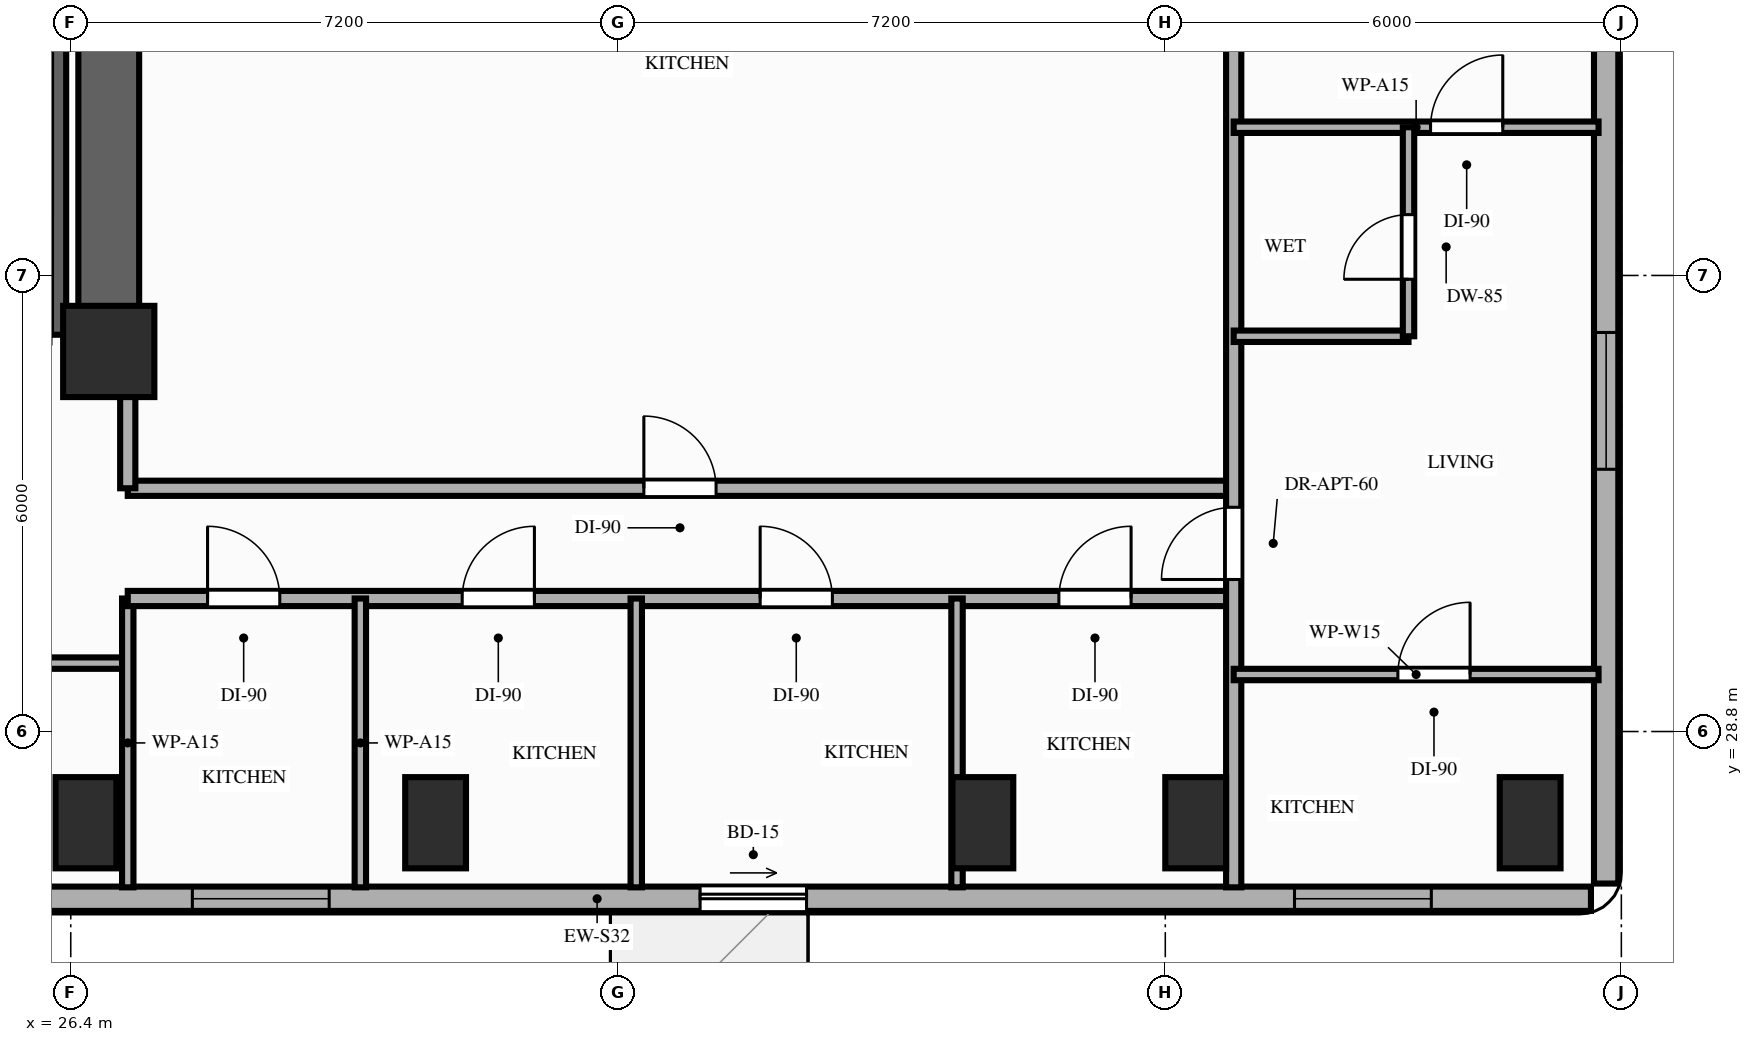
"""IFC4 building model, lengths in metres.
Left out: names, types, materials, properties, quantities, classifications, styles, units other than length and angle.
Written with IfcOpenShell. Run it as: python <this file> out.ifc"""

import sys

from ifc_helpers import new_model, si_unit, direction, frame, frame_2d, origin, origin_2d, place, context, subcontext, project, spatial, rectangle, extrude, element, fill, save


model = new_model("IFC4")
c1 = context("Model", 3, precision=1e-05, world=origin(), true_north=direction((0.0, 1.0)))
c2 = subcontext(c1, "Body", "Model", "MODEL_VIEW")
j1 = project(units=[si_unit("LENGTHUNIT", "METRE"), si_unit("PLANEANGLEUNIT", "RADIAN")], contexts=[c1])
p1 = place(None, origin())
s1 = spatial("IfcSite", under=j1, at=p1, CompositionType="ELEMENT")
p2 = place(p1, origin())
s2 = spatial("IfcBuilding", under=s1, at=p2, CompositionType="ELEMENT")
p3 = place(p2, frame((0.0, 0.0, 99.4)))
s3 = spatial("IfcBuildingStorey", under=s2, at=p3, CompositionType="ELEMENT", Elevation=99.4)
p4 = place(p3, frame((26.9, 33.8, 0.0), z_axis=(0.0, 0.0, 1.0), x_axis=(1.0, 0.0, 0.0)))
e1 = element("IfcColumn", 1, at=p4, inside=s3, PredefinedType="COLUMN", context=c2, shape_type="SweptSolid", body=[
    extrude(rectangle(XDim=1.2, YDim=1.2, at=origin_2d()), origin(), (0.0, 0.0, 1.0), 3.2),
])
for number, where, z_axis, x_axis in (
    (2, (26.6, 27.6, 0.0), (0.0, 0.0, 1.0), (1.0, 0.0, 0.0)),
    (3, (31.2, 27.6, 0.0), (0.0, 0.0, 1.0), (1.0, 0.0, 0.0)),
    (4, (38.4, 27.6, 0.0), (0.0, 0.0, 1.0), (1.0, 0.0, 0.0)),
    (5, (41.2, 27.6, 0.0), (0.0, 0.0, 1.0), (1.0, 0.0, 0.0)),
    (6, (45.6, 27.6, 0.0), (0.0, 0.0, 1.0), (1.0, 0.0, 0.0)),
):
    element("IfcColumn", number, at=place(p3, frame(where, z_axis=z_axis, x_axis=x_axis)), inside=s3, PredefinedType="COLUMN", context=c2, shape_type="SweptSolid", body=[
        extrude(rectangle(XDim=0.8, YDim=1.2, at=origin_2d()), origin(), (0.0, 0.0, 1.0), 3.2),
    ])
p5 = place(p3, frame((20.25, 26.6, 0.0), z_axis=(0.0, 0.0, 1.0), x_axis=(1.0, 0.0, 0.0)))
e7 = element("IfcWall", 7, at=p5, inside=s3, PredefinedType="STANDARD", context=c2, shape_type="SweptSolid", body=[
    extrude(rectangle(XDim=26.15, YDim=0.32, at=frame_2d((13.075, 0.0))), origin(), (0.0, 0.0, 1.0), 2.96),
])
p6 = place(p5, frame((14.43, 0.0, 0.0)))
e8 = element("IfcOpeningElement", 8, at=p6, cuts=e7, PredefinedType="OPENING", context=c2, shape_type="SweptSolid", body=[
    extrude(rectangle(XDim=1.4, YDim=2.1, at=frame_2d((0.7, 1.05))), frame((0.0, 0.17, 0.0), z_axis=(0.0, -1.0, 0.0), x_axis=(1.0, 0.0, 0.0)), (0.0, 0.0, 1.0), 0.34),
])
p7 = place(p5, frame((2.25, 0.0, 0.85)))
e9 = element("IfcOpeningElement", 9, at=p7, cuts=e7, PredefinedType="OPENING", context=c2, shape_type="SweptSolid", body=[
    extrude(rectangle(XDim=1.8, YDim=1.75, at=frame_2d((0.9, 0.875))), frame((0.0, 0.17, 0.0), z_axis=(0.0, -1.0, 0.0), x_axis=(1.0, 0.0, 0.0)), (0.0, 0.0, 1.0), 0.34),
])
p8 = place(p5, frame((7.75, 0.0, 0.85)))
e10 = element("IfcOpeningElement", 10, at=p8, cuts=e7, PredefinedType="OPENING", context=c2, shape_type="SweptSolid", body=[
    extrude(rectangle(XDim=1.8, YDim=1.75, at=frame_2d((0.9, 0.875))), frame((0.0, 0.17, 0.0), z_axis=(0.0, -1.0, 0.0), x_axis=(1.0, 0.0, 0.0)), (0.0, 0.0, 1.0), 0.34),
])
p9 = place(p5, frame((22.25, 0.0, 0.85)))
e11 = element("IfcOpeningElement", 11, at=p9, cuts=e7, PredefinedType="OPENING", context=c2, shape_type="SweptSolid", body=[
    extrude(rectangle(XDim=1.8, YDim=1.75, at=frame_2d((0.9, 0.875))), frame((0.0, 0.17, 0.0), z_axis=(0.0, -1.0, 0.0), x_axis=(1.0, 0.0, 0.0)), (0.0, 0.0, 1.0), 0.34),
])
p10 = place(p3, frame((46.6, 26.8, 0.0), z_axis=(0.0, 0.0, 1.0), x_axis=(0.0, 1.0, 0.0)))
e12 = element("IfcWall", 12, at=p10, inside=s3, PredefinedType="STANDARD", context=c2, shape_type="SweptSolid", body=[
    extrude(rectangle(XDim=15.35, YDim=0.32, at=frame_2d((7.675, 0.0))), origin(), (0.0, 0.0, 1.0), 2.35),
])
p11 = place(p10, frame((5.45, 0.0, 0.85)))
e13 = element("IfcOpeningElement", 13, at=p11, cuts=e12, PredefinedType="OPENING", context=c2, shape_type="SweptSolid", body=[
    extrude(rectangle(XDim=1.8, YDim=1.25, at=frame_2d((0.9, 0.625))), frame((0.0, 0.17, 0.0), z_axis=(0.0, -1.0, 0.0), x_axis=(1.0, 0.0, 0.0)), (0.0, 0.0, 1.0), 0.34),
])
p12 = place(p10, frame((11.68, 0.0, 0.85)))
e14 = element("IfcOpeningElement", 14, at=p12, cuts=e12, PredefinedType="OPENING", context=c2, shape_type="SweptSolid", body=[
    extrude(rectangle(XDim=1.8, YDim=1.25, at=frame_2d((0.9, 0.625))), frame((0.0, 0.17, 0.0), z_axis=(0.0, -1.0, 0.0), x_axis=(1.0, 0.0, 0.0)), (0.0, 0.0, 1.0), 0.34),
])
p13 = place(p3, frame((26.9, 33.8, 0.0), z_axis=(0.0, 0.0, 1.0), x_axis=(0.0, 1.0, 0.0)))
e15 = element("IfcWall", 15, at=p13, inside=s3, PredefinedType="SHEAR", context=c2, shape_type="SweptSolid", body=[
    extrude(rectangle(XDim=7.95, YDim=0.8, at=frame_2d((3.975, 0.0))), origin(), (0.0, 0.0, 1.0), 2.96),
])
p14 = place(p3, frame((26.24, 34.02, 0.0), z_axis=(0.0, 0.0, 1.0), x_axis=(0.0, 1.0, 0.0)))
e16 = element("IfcWall", 16, at=p14, inside=s3, PredefinedType="SHEAR", context=c2, shape_type="SweptSolid", body=[
    extrude(rectangle(XDim=7.78, YDim=0.2, at=frame_2d((3.89, 0.0))), origin(), (0.0, 0.0, 1.0), 2.96),
])
p15 = place(p3, frame((20.45, 29.7, 0.0), z_axis=(0.0, 0.0, 1.0), x_axis=(1.0, 0.0, 0.0)))
e17 = element("IfcWall", 17, at=p15, inside=s3, PredefinedType="PARTITIONING", context=c2, shape_type="SweptSolid", body=[
    extrude(rectangle(XDim=6.7, YDim=0.15, at=frame_2d((3.35, 0.0))), origin(), (0.0, 0.0, 1.0), 2.96),
])
p16 = place(p15, frame((2.8, 0.0, 0.0)))
e18 = element("IfcOpeningElement", 18, at=p16, cuts=e17, PredefinedType="OPENING", context=c2, shape_type="SweptSolid", body=[
    extrude(rectangle(XDim=0.95, YDim=2.15, at=frame_2d((0.475, 1.075))), frame((0.0, 0.085, 0.0), z_axis=(0.0, -1.0, 0.0), x_axis=(1.0, 0.0, 0.0)), (0.0, 0.0, 1.0), 0.17),
])
p17 = place(p3, frame((27.15, 26.75, 0.0), z_axis=(0.0, 0.0, 1.0), x_axis=(0.0, 1.0, 0.0)))
e19 = element("IfcWall", 19, at=p17, inside=s3, PredefinedType="PARTITIONING", context=c2, shape_type="SweptSolid", body=[
    extrude(rectangle(XDim=3.8, YDim=0.15, at=frame_2d((1.9, 0.0))), origin(), (0.0, 0.0, 1.0), 2.35),
])
p18 = place(p3, frame((27.15, 30.55, 0.0), z_axis=(0.0, 0.0, 1.0), x_axis=(1.0, 0.0, 0.0)))
e20 = element("IfcWall", 20, at=p18, inside=s3, PredefinedType="PARTITIONING", context=c2, shape_type="SweptSolid", body=[
    extrude(rectangle(XDim=14.55, YDim=0.2, at=frame_2d((7.275, 0.0))), origin(), (0.0, 0.0, 1.0), 2.35),
])
p19 = place(p18, frame((1.05, 0.0, 0.0)))
e21 = element("IfcOpeningElement", 21, at=p19, cuts=e20, PredefinedType="OPENING", context=c2, shape_type="SweptSolid", body=[
    extrude(rectangle(XDim=0.95, YDim=2.15, at=frame_2d((0.475, 1.075))), frame((0.0, 0.11, 0.0), z_axis=(0.0, -1.0, 0.0), x_axis=(1.0, 0.0, 0.0)), (0.0, 0.0, 1.0), 0.22),
])
p20 = place(p18, frame((4.4, 0.0, 0.0)))
e22 = element("IfcOpeningElement", 22, at=p20, cuts=e20, PredefinedType="OPENING", context=c2, shape_type="SweptSolid", body=[
    extrude(rectangle(XDim=0.95, YDim=2.15, at=frame_2d((0.475, 1.075))), frame((0.0, 0.11, 0.0), z_axis=(0.0, -1.0, 0.0), x_axis=(1.0, 0.0, 0.0)), (0.0, 0.0, 1.0), 0.22),
])
p21 = place(p18, frame((8.32, 0.0, 0.0)))
e23 = element("IfcOpeningElement", 23, at=p21, cuts=e20, PredefinedType="OPENING", context=c2, shape_type="SweptSolid", body=[
    extrude(rectangle(XDim=0.95, YDim=2.15, at=frame_2d((0.475, 1.075))), frame((0.0, 0.11, 0.0), z_axis=(0.0, -1.0, 0.0), x_axis=(1.0, 0.0, 0.0)), (0.0, 0.0, 1.0), 0.22),
])
p22 = place(p18, frame((12.25, 0.0, 0.0)))
e24 = element("IfcOpeningElement", 24, at=p22, cuts=e20, PredefinedType="OPENING", context=c2, shape_type="SweptSolid", body=[
    extrude(rectangle(XDim=0.95, YDim=2.15, at=frame_2d((0.475, 1.075))), frame((0.0, 0.11, 0.0), z_axis=(0.0, -1.0, 0.0), x_axis=(1.0, 0.0, 0.0)), (0.0, 0.0, 1.0), 0.22),
])
p23 = place(p3, frame((27.15, 32.0, 0.0), z_axis=(0.0, 0.0, 1.0), x_axis=(1.0, 0.0, 0.0)))
e25 = element("IfcWall", 25, at=p23, inside=s3, PredefinedType="PARTITIONING", context=c2, shape_type="SweptSolid", body=[
    extrude(rectangle(XDim=14.55, YDim=0.2, at=frame_2d((7.275, 0.0))), origin(), (0.0, 0.0, 1.0), 2.35),
])
p24 = place(p23, frame((6.79, 0.0, 0.0)))
e26 = element("IfcOpeningElement", 26, at=p24, cuts=e25, PredefinedType="OPENING", context=c2, shape_type="SweptSolid", body=[
    extrude(rectangle(XDim=0.95, YDim=2.15, at=frame_2d((0.475, 1.075))), frame((0.0, 0.11, 0.0), z_axis=(0.0, -1.0, 0.0), x_axis=(1.0, 0.0, 0.0)), (0.0, 0.0, 1.0), 0.22),
])
p25 = place(p3, frame((27.15, 32.0, 0.0), z_axis=(0.0, 0.0, 1.0), x_axis=(0.0, 1.0, 0.0)))
e27 = element("IfcWall", 27, at=p25, inside=s3, PredefinedType="PARTITIONING", context=c2, shape_type="SweptSolid", body=[
    extrude(rectangle(XDim=1.68, YDim=0.2, at=frame_2d((0.84, 0.0))), origin(), (0.0, 0.0, 1.0), 2.35),
])
p26 = place(p3, frame((41.7, 26.75, 0.0), z_axis=(0.0, 0.0, 1.0), x_axis=(0.0, 1.0, 0.0)))
e28 = element("IfcWall", 28, at=p26, inside=s3, PredefinedType="PARTITIONING", context=c2, shape_type="SweptSolid", body=[
    extrude(rectangle(XDim=15.45, YDim=0.2, at=frame_2d((7.725, 0.0))), origin(), (0.0, 0.0, 1.0), 2.35),
])
p27 = place(p26, frame((4.05, 0.0, 0.0)))
e29 = element("IfcOpeningElement", 29, at=p27, cuts=e28, PredefinedType="OPENING", context=c2, shape_type="SweptSolid", body=[
    extrude(rectangle(XDim=0.95, YDim=2.15, at=frame_2d((0.475, 1.075))), frame((0.0, 0.11, 0.0), z_axis=(0.0, -1.0, 0.0), x_axis=(1.0, 0.0, 0.0)), (0.0, 0.0, 1.0), 0.22),
])
p28 = place(p3, frame((41.7, 29.55, 0.0), z_axis=(0.0, 0.0, 1.0), x_axis=(1.0, 0.0, 0.0)))
e30 = element("IfcWall", 30, at=p28, inside=s3, PredefinedType="PARTITIONING", context=c2, shape_type="SweptSolid", body=[
    extrude(rectangle(XDim=4.8, YDim=0.15, at=frame_2d((2.4, 0.0))), origin(), (0.0, 0.0, 1.0), 2.35),
])
p29 = place(p28, frame((2.16, 0.0, 0.0)))
e31 = element("IfcOpeningElement", 31, at=p29, cuts=e30, PredefinedType="OPENING", context=c2, shape_type="SweptSolid", body=[
    extrude(rectangle(XDim=0.95, YDim=2.15, at=frame_2d((0.475, 1.075))), frame((0.0, 0.085, 0.0), z_axis=(0.0, -1.0, 0.0), x_axis=(1.0, 0.0, 0.0)), (0.0, 0.0, 1.0), 0.17),
])
p30 = place(p3, frame((41.7, 36.75, 0.0), z_axis=(0.0, 0.0, 1.0), x_axis=(1.0, 0.0, 0.0)))
e32 = element("IfcWall", 32, at=p30, inside=s3, PredefinedType="PARTITIONING", context=c2, shape_type="SweptSolid", body=[
    extrude(rectangle(XDim=4.8, YDim=0.15, at=frame_2d((2.4, 0.0))), origin(), (0.0, 0.0, 1.0), 2.35),
])
p31 = place(p30, frame((2.59, 0.0, 0.0)))
e33 = element("IfcOpeningElement", 33, at=p31, cuts=e32, PredefinedType="OPENING", context=c2, shape_type="SweptSolid", body=[
    extrude(rectangle(XDim=0.95, YDim=2.15, at=frame_2d((0.475, 1.075))), frame((0.0, 0.085, 0.0), z_axis=(0.0, -1.0, 0.0), x_axis=(1.0, 0.0, 0.0)), (0.0, 0.0, 1.0), 0.17),
])
p32 = place(p3, frame((41.7, 34.0, 0.0), z_axis=(0.0, 0.0, 1.0), x_axis=(1.0, 0.0, 0.0)))
e34 = element("IfcWall", 34, at=p32, inside=s3, PredefinedType="PARTITIONING", context=c2, shape_type="SweptSolid", body=[
    extrude(rectangle(XDim=2.3, YDim=0.15, at=frame_2d((1.15, 0.0))), origin(), (0.0, 0.0, 1.0), 2.96),
])
p33 = place(p3, frame((44.0, 34.0, 0.0), z_axis=(0.0, 0.0, 1.0), x_axis=(0.0, 1.0, 0.0)))
e35 = element("IfcWall", 35, at=p33, inside=s3, PredefinedType="PARTITIONING", context=c2, shape_type="SweptSolid", body=[
    extrude(rectangle(XDim=2.75, YDim=0.15, at=frame_2d((1.375, 0.0))), origin(), (0.0, 0.0, 1.0), 2.54),
])
p34 = place(p33, frame((0.75, 0.0, 0.0)))
e36 = element("IfcOpeningElement", 36, at=p34, cuts=e35, PredefinedType="OPENING", context=c2, shape_type="SweptSolid", body=[
    extrude(rectangle(XDim=0.85, YDim=2.1, at=frame_2d((0.425, 1.05))), frame((0.0, 0.085, 0.0), z_axis=(0.0, -1.0, 0.0), x_axis=(1.0, 0.0, 0.0)), (0.0, 0.0, 1.0), 0.17),
])
for number, where, z_axis, x_axis in (
    (37, (30.21, 26.75, 0.0), (0.0, 0.0, 1.0), (0.0, 1.0, 0.0)),
    (38, (33.84, 26.75, 0.0), (0.0, 0.0, 1.0), (0.0, 1.0, 0.0)),
    (39, (38.06, 26.75, 0.0), (0.0, 0.0, 1.0), (0.0, 1.0, 0.0)),
):
    element("IfcWall", number, at=place(p3, frame(where, z_axis=z_axis, x_axis=x_axis)), inside=s3, PredefinedType="PARTITIONING", context=c2, shape_type="SweptSolid", body=[
        extrude(rectangle(XDim=3.8, YDim=0.15, at=frame_2d((1.9, 0.0))), origin(), (0.0, 0.0, 1.0), 2.35),
    ])
p35 = place(p6, origin())
e40 = element("IfcDoor", 40, at=p35, inside=s3, OperationType="SLIDING_TO_RIGHT", PredefinedType="DOOR", context=c2, shape_type="SweptSolid", body=[
    extrude(rectangle(XDim=1.4, YDim=2.1, at=frame_2d((0.7, 1.05))), frame((0.0, 0.025, 0.0), z_axis=(0.0, -1.0, 0.0), x_axis=(1.0, 0.0, 0.0)), (0.0, 0.0, 1.0), 0.05),
])
fill(e8, e40)
p36 = place(p11, origin())
e41 = element("IfcWindow", 41, at=p36, inside=s3, PartitioningType="SINGLE_PANEL", PredefinedType="WINDOW", context=c2, shape_type="SweptSolid", body=[
    extrude(rectangle(XDim=1.8, YDim=1.25, at=frame_2d((0.9, 0.625))), frame((0.0, 0.03, 0.0), z_axis=(0.0, -1.0, 0.0), x_axis=(1.0, 0.0, 0.0)), (0.0, 0.0, 1.0), 0.06),
])
fill(e13, e41)
p37 = place(p8, origin())
e42 = element("IfcWindow", 42, at=p37, inside=s3, PartitioningType="SINGLE_PANEL", PredefinedType="WINDOW", context=c2, shape_type="SweptSolid", body=[
    extrude(rectangle(XDim=1.8, YDim=1.75, at=frame_2d((0.9, 0.875))), frame((0.0, 0.03, 0.0), z_axis=(0.0, -1.0, 0.0), x_axis=(1.0, 0.0, 0.0)), (0.0, 0.0, 1.0), 0.06),
])
fill(e10, e42)
p38 = place(p9, origin())
e43 = element("IfcWindow", 43, at=p38, inside=s3, PartitioningType="SINGLE_PANEL", PredefinedType="WINDOW", context=c2, shape_type="SweptSolid", body=[
    extrude(rectangle(XDim=1.8, YDim=1.75, at=frame_2d((0.9, 0.875))), frame((0.0, 0.03, 0.0), z_axis=(0.0, -1.0, 0.0), x_axis=(1.0, 0.0, 0.0)), (0.0, 0.0, 1.0), 0.06),
])
fill(e11, e43)
p39 = place(p27, origin())
e44 = element("IfcDoor", 44, at=p39, inside=s3, OperationType="SINGLE_SWING_LEFT", PredefinedType="DOOR", context=c2, shape_type="SweptSolid", body=[
    extrude(rectangle(XDim=0.95, YDim=2.15, at=frame_2d((0.475, 1.075))), frame((0.0, 0.025, 0.0), z_axis=(0.0, -1.0, 0.0), x_axis=(1.0, 0.0, 0.0)), (0.0, 0.0, 1.0), 0.05),
])
fill(e29, e44)
p40 = place(p31, origin())
e45 = element("IfcDoor", 45, at=p40, inside=s3, OperationType="SINGLE_SWING_RIGHT", PredefinedType="DOOR", context=c2, shape_type="SweptSolid", body=[
    extrude(rectangle(XDim=0.95, YDim=2.15, at=frame_2d((0.475, 1.075))), frame((0.0, 0.025, 0.0), z_axis=(0.0, -1.0, 0.0), x_axis=(1.0, 0.0, 0.0)), (0.0, 0.0, 1.0), 0.05),
])
fill(e33, e45)
p41 = place(p34, origin())
e46 = element("IfcDoor", 46, at=p41, inside=s3, OperationType="SINGLE_SWING_LEFT", PredefinedType="DOOR", context=c2, shape_type="SweptSolid", body=[
    extrude(rectangle(XDim=0.85, YDim=2.1, at=frame_2d((0.425, 1.05))), frame((0.0, 0.025, 0.0), z_axis=(0.0, -1.0, 0.0), x_axis=(1.0, 0.0, 0.0)), (0.0, 0.0, 1.0), 0.05),
])
fill(e36, e46)
p42 = place(p29, origin())
e47 = element("IfcDoor", 47, at=p42, inside=s3, OperationType="SINGLE_SWING_RIGHT", PredefinedType="DOOR", context=c2, shape_type="SweptSolid", body=[
    extrude(rectangle(XDim=0.95, YDim=2.15, at=frame_2d((0.475, 1.075))), frame((0.0, 0.025, 0.0), z_axis=(0.0, -1.0, 0.0), x_axis=(1.0, 0.0, 0.0)), (0.0, 0.0, 1.0), 0.05),
])
fill(e31, e47)
p43 = place(p19, origin())
e48 = element("IfcDoor", 48, at=p43, inside=s3, OperationType="SINGLE_SWING_LEFT", PredefinedType="DOOR", context=c2, shape_type="SweptSolid", body=[
    extrude(rectangle(XDim=0.95, YDim=2.15, at=frame_2d((0.475, 1.075))), frame((0.0, 0.025, 0.0), z_axis=(0.0, -1.0, 0.0), x_axis=(1.0, 0.0, 0.0)), (0.0, 0.0, 1.0), 0.05),
])
fill(e21, e48)
p44 = place(p20, origin())
e49 = element("IfcDoor", 49, at=p44, inside=s3, OperationType="SINGLE_SWING_RIGHT", PredefinedType="DOOR", context=c2, shape_type="SweptSolid", body=[
    extrude(rectangle(XDim=0.95, YDim=2.15, at=frame_2d((0.475, 1.075))), frame((0.0, 0.025, 0.0), z_axis=(0.0, -1.0, 0.0), x_axis=(1.0, 0.0, 0.0)), (0.0, 0.0, 1.0), 0.05),
])
fill(e22, e49)
p45 = place(p21, origin())
e50 = element("IfcDoor", 50, at=p45, inside=s3, OperationType="SINGLE_SWING_LEFT", PredefinedType="DOOR", context=c2, shape_type="SweptSolid", body=[
    extrude(rectangle(XDim=0.95, YDim=2.15, at=frame_2d((0.475, 1.075))), frame((0.0, 0.025, 0.0), z_axis=(0.0, -1.0, 0.0), x_axis=(1.0, 0.0, 0.0)), (0.0, 0.0, 1.0), 0.05),
])
fill(e23, e50)
p46 = place(p22, origin())
e51 = element("IfcDoor", 51, at=p46, inside=s3, OperationType="SINGLE_SWING_RIGHT", PredefinedType="DOOR", context=c2, shape_type="SweptSolid", body=[
    extrude(rectangle(XDim=0.95, YDim=2.15, at=frame_2d((0.475, 1.075))), frame((0.0, 0.025, 0.0), z_axis=(0.0, -1.0, 0.0), x_axis=(1.0, 0.0, 0.0)), (0.0, 0.0, 1.0), 0.05),
])
fill(e24, e51)
p47 = place(p24, origin())
e52 = element("IfcDoor", 52, at=p47, inside=s3, OperationType="SINGLE_SWING_LEFT", PredefinedType="DOOR", context=c2, shape_type="SweptSolid", body=[
    extrude(rectangle(XDim=0.95, YDim=2.15, at=frame_2d((0.475, 1.075))), frame((0.0, 0.025, 0.0), z_axis=(0.0, -1.0, 0.0), x_axis=(1.0, 0.0, 0.0)), (0.0, 0.0, 1.0), 0.05),
])
fill(e26, e52)
save(model, sys.argv[1])
